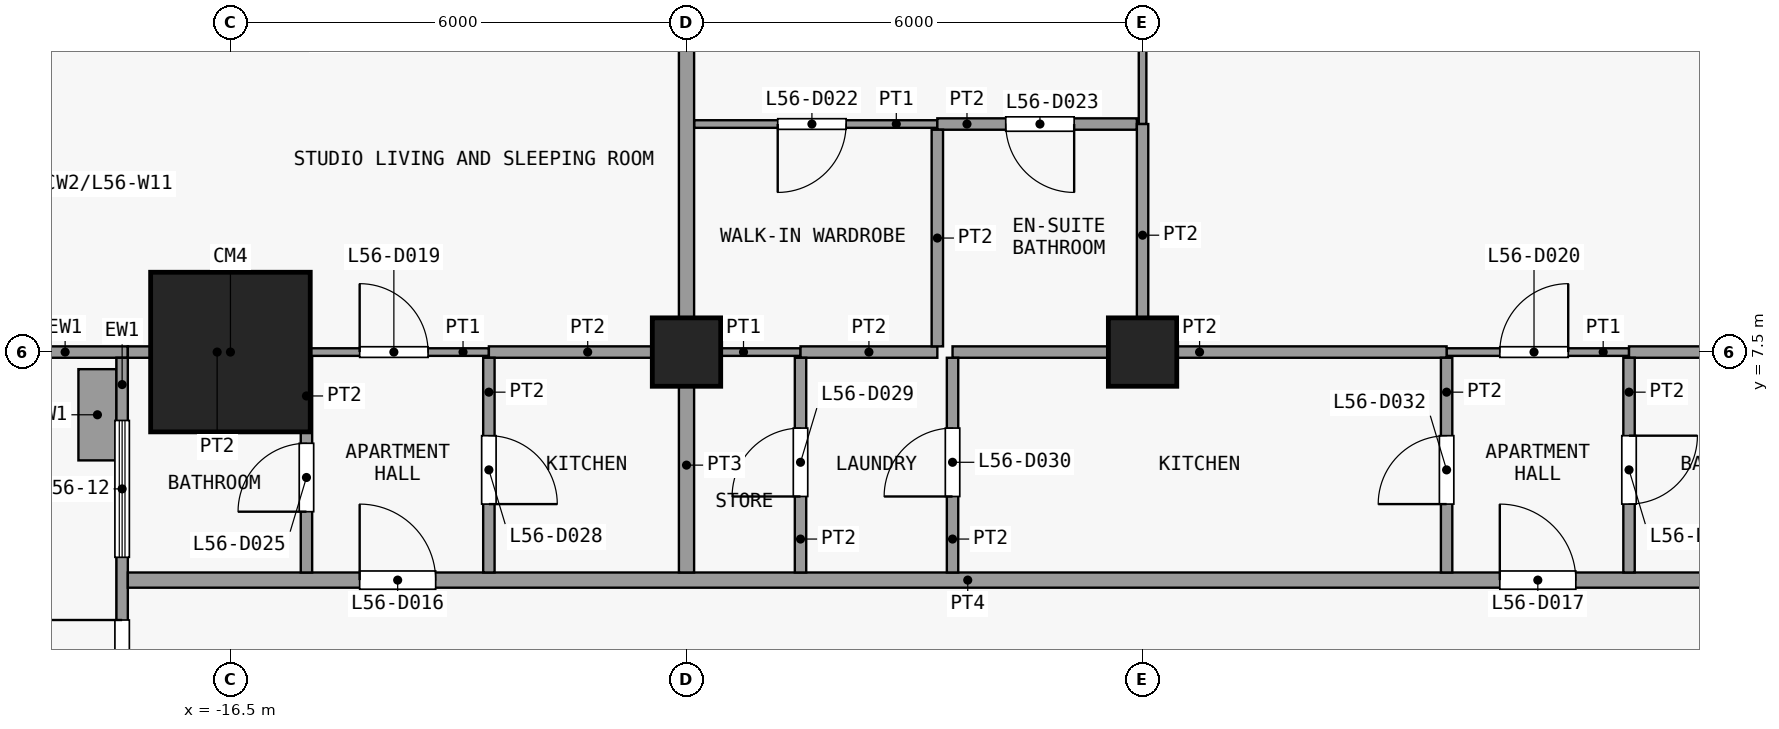
"""IFC4 building model, lengths in metres.
Left out: names, types, materials, properties, quantities, classifications, styles, units other than length and angle.
Written with IfcOpenShell. Run it as: python <this file> out.ifc"""

import sys

from ifc_helpers import new_model, si_unit, direction, frame, frame_2d, origin, origin_2d, place, context, subcontext, project, spatial, rectangle, extrude, element, fill, save


model = new_model("IFC4")
c1 = context("Model", 3, precision=1e-05, world=origin(), true_north=direction((0.0, 1.0)))
c2 = subcontext(c1, "Body", "Model", "MODEL_VIEW")
j1 = project(units=[si_unit("LENGTHUNIT", "METRE"), si_unit("PLANEANGLEUNIT", "RADIAN")], contexts=[c1])
p1 = place(None, origin())
s1 = spatial("IfcSite", under=j1, at=p1, CompositionType="ELEMENT")
p2 = place(p1, origin())
s2 = spatial("IfcBuilding", under=s1, at=p2, CompositionType="ELEMENT")
p3 = place(p2, frame((0.0, 0.0, 223.1)))
s3 = spatial("IfcBuildingStorey", under=s2, at=p3, CompositionType="ELEMENT", Elevation=223.1)
p4 = place(p3, frame((-16.5, 7.5, 0.0), z_axis=(0.0, 0.0, 1.0), x_axis=(1.0, 0.0, 0.0)))
e1 = element("IfcColumn", 1, at=p4, inside=s3, PredefinedType="COLUMN", context=c2, shape_type="SweptSolid", body=[
    extrude(rectangle(XDim=2.1, YDim=2.1, at=origin_2d()), origin(), (0.0, 0.0, 1.0), 3.6),
])
for number, where, z_axis, x_axis in (
    (2, (-10.5, 7.5, 0.0), (0.0, 0.0, 1.0), (1.0, 0.0, 0.0)),
    (3, (-4.5, 7.5, 0.0), (0.0, 0.0, 1.0), (1.0, 0.0, 0.0)),
):
    element("IfcColumn", number, at=place(p3, frame(where, z_axis=z_axis, x_axis=x_axis)), inside=s3, PredefinedType="COLUMN", context=c2, shape_type="SweptSolid", body=[
        extrude(rectangle(XDim=0.9, YDim=0.9, at=origin_2d()), origin(), (0.0, 0.0, 1.0), 3.6),
    ])
p5 = place(p3, frame((-17.85, 7.5, 0.0), z_axis=(0.0, 0.0, 1.0), x_axis=(-1.0, 0.0, 0.0)))
e4 = element("IfcWall", 4, at=p5, inside=s3, PredefinedType="SOLIDWALL", context=c2, shape_type="SweptSolid", body=[
    extrude(rectangle(XDim=1.65, YDim=0.15, at=frame_2d((0.825, 0.0))), origin(), (0.0, 0.0, 1.0), 3.3),
])
p6 = place(p3, frame((-17.925, 1.575, 0.0), z_axis=(0.0, 0.0, 1.0), x_axis=(0.0, 1.0, 0.0)))
e5 = element("IfcWall", 5, at=p6, inside=s3, PredefinedType="SOLIDWALL", context=c2, shape_type="SweptSolid", body=[
    extrude(rectangle(XDim=5.85, YDim=0.15, at=frame_2d((2.925, 0.0))), origin(), (0.0, 0.0, 1.0), 3.3),
])
p7 = place(p6, frame((1.2, 0.0, 0.0)))
e6 = element("IfcOpeningElement", 6, at=p7, cuts=e5, PredefinedType="OPENING", context=c2, shape_type="SweptSolid", body=[
    extrude(rectangle(XDim=1.2, YDim=2.4, at=frame_2d((0.6, 1.2))), frame((0.0, 0.085, 0.0), z_axis=(0.0, -1.0, 0.0), x_axis=(1.0, 0.0, 0.0)), (0.0, 0.0, 1.0), 0.17),
])
p8 = place(p6, frame((0.25, 0.0, 0.9)))
e7 = element("IfcOpeningElement", 7, at=p8, cuts=e5, PredefinedType="OPENING", context=c2, shape_type="SweptSolid", body=[
    extrude(rectangle(XDim=0.7, YDim=2.1, at=frame_2d((0.35, 1.05))), frame((0.0, 0.085, 0.0), z_axis=(0.0, -1.0, 0.0), x_axis=(1.0, 0.0, 0.0)), (0.0, 0.0, 1.0), 0.17),
])
p9 = place(p6, frame((3.225, 0.0, 0.9)))
e8 = element("IfcOpeningElement", 8, at=p9, cuts=e5, PredefinedType="OPENING", context=c2, shape_type="SweptSolid", body=[
    extrude(rectangle(XDim=1.8, YDim=2.1, at=frame_2d((0.9, 1.05))), frame((0.0, 0.085, 0.0), z_axis=(0.0, -1.0, 0.0), x_axis=(1.0, 0.0, 0.0)), (0.0, 0.0, 1.0), 0.17),
])
p10 = place(p3, frame((-18.25, 6.075, 0.0), z_axis=(0.0, 0.0, 1.0), x_axis=(0.0, 1.0, 0.0)))
e9 = element("IfcWall", 9, at=p10, inside=s3, PredefinedType="USERDEFINED", context=c2, shape_type="SweptSolid", body=[
    extrude(rectangle(XDim=1.2, YDim=0.5, at=frame_2d((0.6, 0.0))), origin(), (0.0, 0.0, 1.0), 0.9),
])
p11 = place(p3, frame((-17.85, 4.5, 0.0), z_axis=(0.0, 0.0, 1.0), x_axis=(1.0, 0.0, 0.0)))
e10 = element("IfcWall", 10, at=p11, inside=s3, PredefinedType="PARTITIONING", context=c2, shape_type="SweptSolid", body=[
    extrude(rectangle(XDim=37.2, YDim=0.2, at=frame_2d((18.6, 0.0))), origin(), (0.0, 0.0, 1.0), 3.3),
])
p12 = place(p11, frame((3.05, 0.0, 0.0)))
e11 = element("IfcOpeningElement", 11, at=p12, cuts=e10, PredefinedType="OPENING", context=c2, shape_type="SweptSolid", body=[
    extrude(rectangle(XDim=1.0, YDim=2.1, at=frame_2d((0.5, 1.05))), frame((0.0, 0.11, 0.0), z_axis=(0.0, -1.0, 0.0), x_axis=(1.0, 0.0, 0.0)), (0.0, 0.0, 1.0), 0.22),
])
p13 = place(p11, frame((18.05, 0.0, 0.0)))
e12 = element("IfcOpeningElement", 12, at=p13, cuts=e10, PredefinedType="OPENING", context=c2, shape_type="SweptSolid", body=[
    extrude(rectangle(XDim=1.0, YDim=2.1, at=frame_2d((0.5, 1.05))), frame((0.0, 0.11, 0.0), z_axis=(0.0, -1.0, 0.0), x_axis=(1.0, 0.0, 0.0)), (0.0, 0.0, 1.0), 0.22),
])
p14 = place(p11, frame((25.55, 0.0, 0.0)))
e13 = element("IfcOpeningElement", 13, at=p14, cuts=e10, PredefinedType="OPENING", context=c2, shape_type="SweptSolid", body=[
    extrude(rectangle(XDim=1.0, YDim=2.1, at=frame_2d((0.5, 1.05))), frame((0.0, 0.11, 0.0), z_axis=(0.0, -1.0, 0.0), x_axis=(1.0, 0.0, 0.0)), (0.0, 0.0, 1.0), 0.22),
])
p15 = place(p3, frame((-15.5, 7.5, 0.0), z_axis=(0.0, 0.0, 1.0), x_axis=(1.0, 0.0, 0.0)))
e14 = element("IfcWall", 14, at=p15, inside=s3, PredefinedType="PARTITIONING", context=c2, shape_type="SweptSolid", body=[
    extrude(rectangle(XDim=2.4, YDim=0.1, at=frame_2d((1.2, 0.0))), origin(), (0.0, 0.0, 1.0), 3.3),
])
p16 = place(p15, frame((0.7, 0.0, 0.0)))
e15 = element("IfcOpeningElement", 15, at=p16, cuts=e14, PredefinedType="OPENING", context=c2, shape_type="SweptSolid", body=[
    extrude(rectangle(XDim=0.9, YDim=2.1, at=frame_2d((0.45, 1.05))), frame((0.0, 0.06, 0.0), z_axis=(0.0, -1.0, 0.0), x_axis=(1.0, 0.0, 0.0)), (0.0, 0.0, 1.0), 0.12),
])
p17 = place(p3, frame((-10.5, 7.5, 0.0), z_axis=(0.0, 0.0, 1.0), x_axis=(1.0, 0.0, 0.0)))
e16 = element("IfcWall", 16, at=p17, inside=s3, PredefinedType="PARTITIONING", context=c2, shape_type="SweptSolid", body=[
    extrude(rectangle(XDim=1.5, YDim=0.1, at=frame_2d((0.75, 0.0))), origin(), (0.0, 0.0, 1.0), 3.3),
])
p18 = place(p3, frame((-0.5, 7.5, 0.0), z_axis=(0.0, 0.0, 1.0), x_axis=(1.0, 0.0, 0.0)))
e17 = element("IfcWall", 17, at=p18, inside=s3, PredefinedType="PARTITIONING", context=c2, shape_type="SweptSolid", body=[
    extrude(rectangle(XDim=2.4, YDim=0.1, at=frame_2d((1.2, 0.0))), origin(), (0.0, 0.0, 1.0), 3.3),
])
p19 = place(p18, frame((0.7, 0.0, 0.0)))
e18 = element("IfcOpeningElement", 18, at=p19, cuts=e17, PredefinedType="OPENING", context=c2, shape_type="SweptSolid", body=[
    extrude(rectangle(XDim=0.9, YDim=2.1, at=frame_2d((0.45, 1.05))), frame((0.0, 0.06, 0.0), z_axis=(0.0, -1.0, 0.0), x_axis=(1.0, 0.0, 0.0)), (0.0, 0.0, 1.0), 0.12),
])
p20 = place(p3, frame((-17.85, 7.5, 0.0), z_axis=(0.0, 0.0, 1.0), x_axis=(1.0, 0.0, 0.0)))
e19 = element("IfcWall", 19, at=p20, inside=s3, PredefinedType="PARTITIONING", context=c2, shape_type="SweptSolid", body=[
    extrude(rectangle(XDim=2.35, YDim=0.15, at=frame_2d((1.175, 0.0))), origin(), (0.0, 0.0, 1.0), 3.3),
])
p21 = place(p3, frame((-13.1, 7.5, 0.0), z_axis=(0.0, 0.0, 1.0), x_axis=(1.0, 0.0, 0.0)))
e20 = element("IfcWall", 20, at=p21, inside=s3, PredefinedType="PARTITIONING", context=c2, shape_type="SweptSolid", body=[
    extrude(rectangle(XDim=2.6, YDim=0.15, at=frame_2d((1.3, 0.0))), origin(), (0.0, 0.0, 1.0), 3.3),
])
p22 = place(p3, frame((-9.0, 7.5, 0.0), z_axis=(0.0, 0.0, 1.0), x_axis=(1.0, 0.0, 0.0)))
e21 = element("IfcWall", 21, at=p22, inside=s3, PredefinedType="PARTITIONING", context=c2, shape_type="SweptSolid", body=[
    extrude(rectangle(XDim=1.8, YDim=0.15, at=frame_2d((0.9, 0.0))), origin(), (0.0, 0.0, 1.0), 3.3),
])
p23 = place(p3, frame((-7.0, 7.5, 0.0), z_axis=(0.0, 0.0, 1.0), x_axis=(1.0, 0.0, 0.0)))
e22 = element("IfcWall", 22, at=p23, inside=s3, PredefinedType="PARTITIONING", context=c2, shape_type="SweptSolid", body=[
    extrude(rectangle(XDim=6.5, YDim=0.15, at=frame_2d((3.25, 0.0))), origin(), (0.0, 0.0, 1.0), 3.3),
])
p24 = place(p3, frame((1.9, 7.5, 0.0), z_axis=(0.0, 0.0, 1.0), x_axis=(1.0, 0.0, 0.0)))
e23 = element("IfcWall", 23, at=p24, inside=s3, PredefinedType="PARTITIONING", context=c2, shape_type="SweptSolid", body=[
    extrude(rectangle(XDim=5.1, YDim=0.15, at=frame_2d((2.55, 0.0))), origin(), (0.0, 0.0, 1.0), 3.3),
])
p25 = place(p3, frame((-10.4, 10.5, 0.0), z_axis=(0.0, 0.0, 1.0), x_axis=(1.0, 0.0, 0.0)))
e24 = element("IfcWall", 24, at=p25, inside=s3, PredefinedType="PARTITIONING", context=c2, shape_type="SweptSolid", body=[
    extrude(rectangle(XDim=3.2, YDim=0.1, at=frame_2d((1.6, 0.0))), origin(), (0.0, 0.0, 1.0), 3.3),
])
p26 = place(p25, frame((1.1, 0.0, 0.0)))
e25 = element("IfcOpeningElement", 25, at=p26, cuts=e24, PredefinedType="OPENING", context=c2, shape_type="SweptSolid", body=[
    extrude(rectangle(XDim=0.9, YDim=2.1, at=frame_2d((0.45, 1.05))), frame((0.0, 0.06, 0.0), z_axis=(0.0, -1.0, 0.0), x_axis=(1.0, 0.0, 0.0)), (0.0, 0.0, 1.0), 0.12),
])
p27 = place(p3, frame((-7.2, 10.5, 0.0), z_axis=(0.0, 0.0, 1.0), x_axis=(1.0, 0.0, 0.0)))
e26 = element("IfcWall", 26, at=p27, inside=s3, PredefinedType="PARTITIONING", context=c2, shape_type="SweptSolid", body=[
    extrude(rectangle(XDim=2.625, YDim=0.15, at=frame_2d((1.312, 0.0))), origin(), (0.0, 0.0, 1.0), 3.3),
])
p28 = place(p27, frame((0.9, 0.0, 0.0)))
e27 = element("IfcOpeningElement", 27, at=p28, cuts=e26, PredefinedType="OPENING", context=c2, shape_type="SweptSolid", body=[
    extrude(rectangle(XDim=0.9, YDim=2.1, at=frame_2d((0.45, 1.05))), frame((0.0, 0.085, 0.0), z_axis=(0.0, -1.0, 0.0), x_axis=(1.0, 0.0, 0.0)), (0.0, 0.0, 1.0), 0.17),
])
p29 = place(p3, frame((-15.5, 4.6, 0.0), z_axis=(0.0, 0.0, 1.0), x_axis=(0.0, 1.0, 0.0)))
e28 = element("IfcWall", 28, at=p29, inside=s3, PredefinedType="PARTITIONING", context=c2, shape_type="SweptSolid", body=[
    extrude(rectangle(XDim=2.825, YDim=0.15, at=frame_2d((1.413, 0.0))), origin(), (0.0, 0.0, 1.0), 3.3),
])
p30 = place(p29, frame((0.8, 0.0, 0.0)))
e29 = element("IfcOpeningElement", 29, at=p30, cuts=e28, PredefinedType="OPENING", context=c2, shape_type="SweptSolid", body=[
    extrude(rectangle(XDim=0.9, YDim=2.1, at=frame_2d((0.45, 1.05))), frame((0.0, 0.085, 0.0), z_axis=(0.0, -1.0, 0.0), x_axis=(1.0, 0.0, 0.0)), (0.0, 0.0, 1.0), 0.17),
])
p31 = place(p3, frame((-13.1, 4.6, 0.0), z_axis=(0.0, 0.0, 1.0), x_axis=(0.0, 1.0, 0.0)))
e30 = element("IfcWall", 30, at=p31, inside=s3, PredefinedType="PARTITIONING", context=c2, shape_type="SweptSolid", body=[
    extrude(rectangle(XDim=2.825, YDim=0.15, at=frame_2d((1.413, 0.0))), origin(), (0.0, 0.0, 1.0), 3.3),
])
p32 = place(p31, frame((0.9, 0.0, 0.0)))
e31 = element("IfcOpeningElement", 31, at=p32, cuts=e30, PredefinedType="OPENING", context=c2, shape_type="SweptSolid", body=[
    extrude(rectangle(XDim=0.9, YDim=2.1, at=frame_2d((0.45, 1.05))), frame((0.0, 0.085, 0.0), z_axis=(0.0, -1.0, 0.0), x_axis=(1.0, 0.0, 0.0)), (0.0, 0.0, 1.0), 0.17),
])
p33 = place(p3, frame((-10.5, 4.6, 0.0), z_axis=(0.0, 0.0, 1.0), x_axis=(0.0, 1.0, 0.0)))
e32 = element("IfcWall", 32, at=p33, inside=s3, PredefinedType="PARTITIONING", context=c2, shape_type="SweptSolid", body=[
    extrude(rectangle(XDim=2.825, YDim=0.2, at=frame_2d((1.413, 0.0))), origin(), (0.0, 0.0, 1.0), 3.3),
])
p34 = place(p3, frame((-10.5, 7.575, 0.0), z_axis=(0.0, 0.0, 1.0), x_axis=(0.0, 1.0, 0.0)))
e33 = element("IfcWall", 33, at=p34, inside=s3, PredefinedType="PARTITIONING", context=c2, shape_type="SweptSolid", body=[
    extrude(rectangle(XDim=8.688, YDim=0.2, at=frame_2d((4.344, 0.0))), origin(), (0.0, 0.0, 1.0), 3.3),
])
p35 = place(p3, frame((-9.0, 4.6, 0.0), z_axis=(0.0, 0.0, 1.0), x_axis=(0.0, 1.0, 0.0)))
e34 = element("IfcWall", 34, at=p35, inside=s3, PredefinedType="PARTITIONING", context=c2, shape_type="SweptSolid", body=[
    extrude(rectangle(XDim=2.825, YDim=0.15, at=frame_2d((1.413, 0.0))), origin(), (0.0, 0.0, 1.0), 3.3),
])
p36 = place(p35, frame((1.0, 0.0, 0.0)))
e35 = element("IfcOpeningElement", 35, at=p36, cuts=e34, PredefinedType="OPENING", context=c2, shape_type="SweptSolid", body=[
    extrude(rectangle(XDim=0.9, YDim=2.1, at=frame_2d((0.45, 1.05))), frame((0.0, 0.085, 0.0), z_axis=(0.0, -1.0, 0.0), x_axis=(1.0, 0.0, 0.0)), (0.0, 0.0, 1.0), 0.17),
])
p37 = place(p3, frame((-7.2, 7.575, 0.0), z_axis=(0.0, 0.0, 1.0), x_axis=(0.0, 1.0, 0.0)))
e36 = element("IfcWall", 36, at=p37, inside=s3, PredefinedType="PARTITIONING", context=c2, shape_type="SweptSolid", body=[
    extrude(rectangle(XDim=2.85, YDim=0.15, at=frame_2d((1.425, 0.0))), origin(), (0.0, 0.0, 1.0), 3.3),
])
p38 = place(p3, frame((-7.0, 4.6, 0.0), z_axis=(0.0, 0.0, 1.0), x_axis=(0.0, 1.0, 0.0)))
e37 = element("IfcWall", 37, at=p38, inside=s3, PredefinedType="PARTITIONING", context=c2, shape_type="SweptSolid", body=[
    extrude(rectangle(XDim=2.825, YDim=0.15, at=frame_2d((1.413, 0.0))), origin(), (0.0, 0.0, 1.0), 3.3),
])
p39 = place(p38, frame((1.0, 0.0, 0.0)))
e38 = element("IfcOpeningElement", 38, at=p39, cuts=e37, PredefinedType="OPENING", context=c2, shape_type="SweptSolid", body=[
    extrude(rectangle(XDim=0.9, YDim=2.1, at=frame_2d((0.45, 1.05))), frame((0.0, 0.085, 0.0), z_axis=(0.0, -1.0, 0.0), x_axis=(1.0, 0.0, 0.0)), (0.0, 0.0, 1.0), 0.17),
])
p40 = place(p3, frame((-4.5, 10.5, 0.0), z_axis=(0.0, 0.0, 1.0), x_axis=(0.0, 1.0, 0.0)))
e39 = element("IfcWall", 39, at=p40, inside=s3, PredefinedType="PARTITIONING", context=c2, shape_type="SweptSolid", body=[
    extrude(rectangle(XDim=5.762, YDim=0.1, at=frame_2d((2.881, 0.0))), origin(), (0.0, 0.0, 1.0), 3.3),
])
p41 = place(p40, frame((1.6, 0.0, 0.0)))
e40 = element("IfcOpeningElement", 40, at=p41, cuts=e39, PredefinedType="OPENING", context=c2, shape_type="SweptSolid", body=[
    extrude(rectangle(XDim=0.9, YDim=2.1, at=frame_2d((0.45, 1.05))), frame((0.0, 0.06, 0.0), z_axis=(0.0, -1.0, 0.0), x_axis=(1.0, 0.0, 0.0)), (0.0, 0.0, 1.0), 0.12),
])
p42 = place(p3, frame((-4.5, 7.575, 0.0), z_axis=(0.0, 0.0, 1.0), x_axis=(0.0, 1.0, 0.0)))
e41 = element("IfcWall", 41, at=p42, inside=s3, PredefinedType="PARTITIONING", context=c2, shape_type="SweptSolid", body=[
    extrude(rectangle(XDim=2.925, YDim=0.15, at=frame_2d((1.462, 0.0))), origin(), (0.0, 0.0, 1.0), 3.3),
])
p43 = place(p3, frame((-0.5, 4.6, 0.0), z_axis=(0.0, 0.0, 1.0), x_axis=(0.0, 1.0, 0.0)))
e42 = element("IfcWall", 42, at=p43, inside=s3, PredefinedType="PARTITIONING", context=c2, shape_type="SweptSolid", body=[
    extrude(rectangle(XDim=2.825, YDim=0.15, at=frame_2d((1.413, 0.0))), origin(), (0.0, 0.0, 1.0), 3.3),
])
p44 = place(p43, frame((0.9, 0.0, 0.0)))
e43 = element("IfcOpeningElement", 43, at=p44, cuts=e42, PredefinedType="OPENING", context=c2, shape_type="SweptSolid", body=[
    extrude(rectangle(XDim=0.9, YDim=2.1, at=frame_2d((0.45, 1.05))), frame((0.0, 0.085, 0.0), z_axis=(0.0, -1.0, 0.0), x_axis=(1.0, 0.0, 0.0)), (0.0, 0.0, 1.0), 0.17),
])
p45 = place(p3, frame((1.9, 4.6, 0.0), z_axis=(0.0, 0.0, 1.0), x_axis=(0.0, 1.0, 0.0)))
e44 = element("IfcWall", 44, at=p45, inside=s3, PredefinedType="PARTITIONING", context=c2, shape_type="SweptSolid", body=[
    extrude(rectangle(XDim=2.825, YDim=0.15, at=frame_2d((1.413, 0.0))), origin(), (0.0, 0.0, 1.0), 3.3),
])
p46 = place(p45, frame((0.9, 0.0, 0.0)))
e45 = element("IfcOpeningElement", 45, at=p46, cuts=e44, PredefinedType="OPENING", context=c2, shape_type="SweptSolid", body=[
    extrude(rectangle(XDim=0.9, YDim=2.1, at=frame_2d((0.45, 1.05))), frame((0.0, 0.085, 0.0), z_axis=(0.0, -1.0, 0.0), x_axis=(1.0, 0.0, 0.0)), (0.0, 0.0, 1.0), 0.17),
])
p47 = place(p7, origin())
e46 = element("IfcDoor", 46, at=p47, inside=s3, OperationType="SINGLE_SWING_RIGHT", PredefinedType="DOOR", context=c2, shape_type="SweptSolid", body=[
    extrude(rectangle(XDim=1.2, YDim=2.4, at=frame_2d((0.6, 1.2))), frame((0.0, 0.025, 0.0), z_axis=(0.0, -1.0, 0.0), x_axis=(1.0, 0.0, 0.0)), (0.0, 0.0, 1.0), 0.05),
])
fill(e6, e46)
p48 = place(p9, origin())
e47 = element("IfcWindow", 47, at=p48, inside=s3, PartitioningType="SINGLE_PANEL", PredefinedType="WINDOW", context=c2, shape_type="SweptSolid", body=[
    extrude(rectangle(XDim=1.8, YDim=2.1, at=frame_2d((0.9, 1.05))), frame((0.0, 0.03, 0.0), z_axis=(0.0, -1.0, 0.0), x_axis=(1.0, 0.0, 0.0)), (0.0, 0.0, 1.0), 0.06),
])
fill(e8, e47)
p49 = place(p12, origin())
e48 = element("IfcDoor", 48, at=p49, inside=s3, OperationType="SINGLE_SWING_RIGHT", PredefinedType="DOOR", context=c2, shape_type="SweptSolid", body=[
    extrude(rectangle(XDim=1.0, YDim=2.1, at=frame_2d((0.5, 1.05))), frame((0.0, 0.025, 0.0), z_axis=(0.0, -1.0, 0.0), x_axis=(1.0, 0.0, 0.0)), (0.0, 0.0, 1.0), 0.05),
])
fill(e11, e48)
p50 = place(p13, origin())
e49 = element("IfcDoor", 49, at=p50, inside=s3, OperationType="SINGLE_SWING_RIGHT", PredefinedType="DOOR", context=c2, shape_type="SweptSolid", body=[
    extrude(rectangle(XDim=1.0, YDim=2.1, at=frame_2d((0.5, 1.05))), frame((0.0, 0.025, 0.0), z_axis=(0.0, -1.0, 0.0), x_axis=(1.0, 0.0, 0.0)), (0.0, 0.0, 1.0), 0.05),
])
fill(e12, e49)
p51 = place(p16, origin())
e50 = element("IfcDoor", 50, at=p51, inside=s3, OperationType="SINGLE_SWING_RIGHT", PredefinedType="DOOR", context=c2, shape_type="SweptSolid", body=[
    extrude(rectangle(XDim=0.9, YDim=2.1, at=frame_2d((0.45, 1.05))), frame((0.0, 0.025, 0.0), z_axis=(0.0, -1.0, 0.0), x_axis=(1.0, 0.0, 0.0)), (0.0, 0.0, 1.0), 0.05),
])
fill(e15, e50)
p52 = place(p19, origin())
e51 = element("IfcDoor", 51, at=p52, inside=s3, OperationType="SINGLE_SWING_LEFT", PredefinedType="DOOR", context=c2, shape_type="SweptSolid", body=[
    extrude(rectangle(XDim=0.9, YDim=2.1, at=frame_2d((0.45, 1.05))), frame((0.0, 0.025, 0.0), z_axis=(0.0, -1.0, 0.0), x_axis=(1.0, 0.0, 0.0)), (0.0, 0.0, 1.0), 0.05),
])
fill(e18, e51)
p53 = place(p26, origin())
e52 = element("IfcDoor", 52, at=p53, inside=s3, OperationType="SINGLE_SWING_LEFT", PredefinedType="DOOR", context=c2, shape_type="SweptSolid", body=[
    extrude(rectangle(XDim=0.9, YDim=2.1, at=frame_2d((0.45, 1.05))), frame((0.0, 0.025, 0.0), z_axis=(0.0, -1.0, 0.0), x_axis=(1.0, 0.0, 0.0)), (0.0, 0.0, 1.0), 0.05),
])
fill(e25, e52)
p54 = place(p28, origin())
e53 = element("IfcDoor", 53, at=p54, inside=s3, OperationType="SINGLE_SWING_RIGHT", PredefinedType="DOOR", context=c2, shape_type="SweptSolid", body=[
    extrude(rectangle(XDim=0.9, YDim=2.1, at=frame_2d((0.45, 1.05))), frame((0.0, 0.025, 0.0), z_axis=(0.0, -1.0, 0.0), x_axis=(1.0, 0.0, 0.0)), (0.0, 0.0, 1.0), 0.05),
])
fill(e27, e53)
p55 = place(p30, origin())
e54 = element("IfcDoor", 54, at=p55, inside=s3, OperationType="SINGLE_SWING_RIGHT", PredefinedType="DOOR", context=c2, shape_type="SweptSolid", body=[
    extrude(rectangle(XDim=0.9, YDim=2.1, at=frame_2d((0.45, 1.05))), frame((0.0, 0.025, 0.0), z_axis=(0.0, -1.0, 0.0), x_axis=(1.0, 0.0, 0.0)), (0.0, 0.0, 1.0), 0.05),
])
fill(e29, e54)
p56 = place(p32, origin())
e55 = element("IfcDoor", 55, at=p56, inside=s3, OperationType="SINGLE_SWING_LEFT", PredefinedType="DOOR", context=c2, shape_type="SweptSolid", body=[
    extrude(rectangle(XDim=0.9, YDim=2.1, at=frame_2d((0.45, 1.05))), frame((0.0, 0.025, 0.0), z_axis=(0.0, -1.0, 0.0), x_axis=(1.0, 0.0, 0.0)), (0.0, 0.0, 1.0), 0.05),
])
fill(e31, e55)
p57 = place(p36, origin())
e56 = element("IfcDoor", 56, at=p57, inside=s3, OperationType="SINGLE_SWING_RIGHT", PredefinedType="DOOR", context=c2, shape_type="SweptSolid", body=[
    extrude(rectangle(XDim=0.9, YDim=2.1, at=frame_2d((0.45, 1.05))), frame((0.0, 0.025, 0.0), z_axis=(0.0, -1.0, 0.0), x_axis=(1.0, 0.0, 0.0)), (0.0, 0.0, 1.0), 0.05),
])
fill(e35, e56)
p58 = place(p39, origin())
e57 = element("IfcDoor", 57, at=p58, inside=s3, OperationType="SINGLE_SWING_RIGHT", PredefinedType="DOOR", context=c2, shape_type="SweptSolid", body=[
    extrude(rectangle(XDim=0.9, YDim=2.1, at=frame_2d((0.45, 1.05))), frame((0.0, 0.025, 0.0), z_axis=(0.0, -1.0, 0.0), x_axis=(1.0, 0.0, 0.0)), (0.0, 0.0, 1.0), 0.05),
])
fill(e38, e57)
p59 = place(p44, origin())
e58 = element("IfcDoor", 58, at=p59, inside=s3, OperationType="SINGLE_SWING_RIGHT", PredefinedType="DOOR", context=c2, shape_type="SweptSolid", body=[
    extrude(rectangle(XDim=0.9, YDim=2.1, at=frame_2d((0.45, 1.05))), frame((0.0, 0.025, 0.0), z_axis=(0.0, -1.0, 0.0), x_axis=(1.0, 0.0, 0.0)), (0.0, 0.0, 1.0), 0.05),
])
fill(e43, e58)
p60 = place(p46, origin())
e59 = element("IfcDoor", 59, at=p60, inside=s3, OperationType="SINGLE_SWING_RIGHT", PredefinedType="DOOR", context=c2, shape_type="SweptSolid", body=[
    extrude(rectangle(XDim=0.9, YDim=2.1, at=frame_2d((0.45, 1.05))), frame((0.0, 0.025, 0.0), z_axis=(0.0, -1.0, 0.0), x_axis=(1.0, 0.0, 0.0)), (0.0, 0.0, 1.0), 0.05),
])
fill(e45, e59)
save(model, sys.argv[1])
